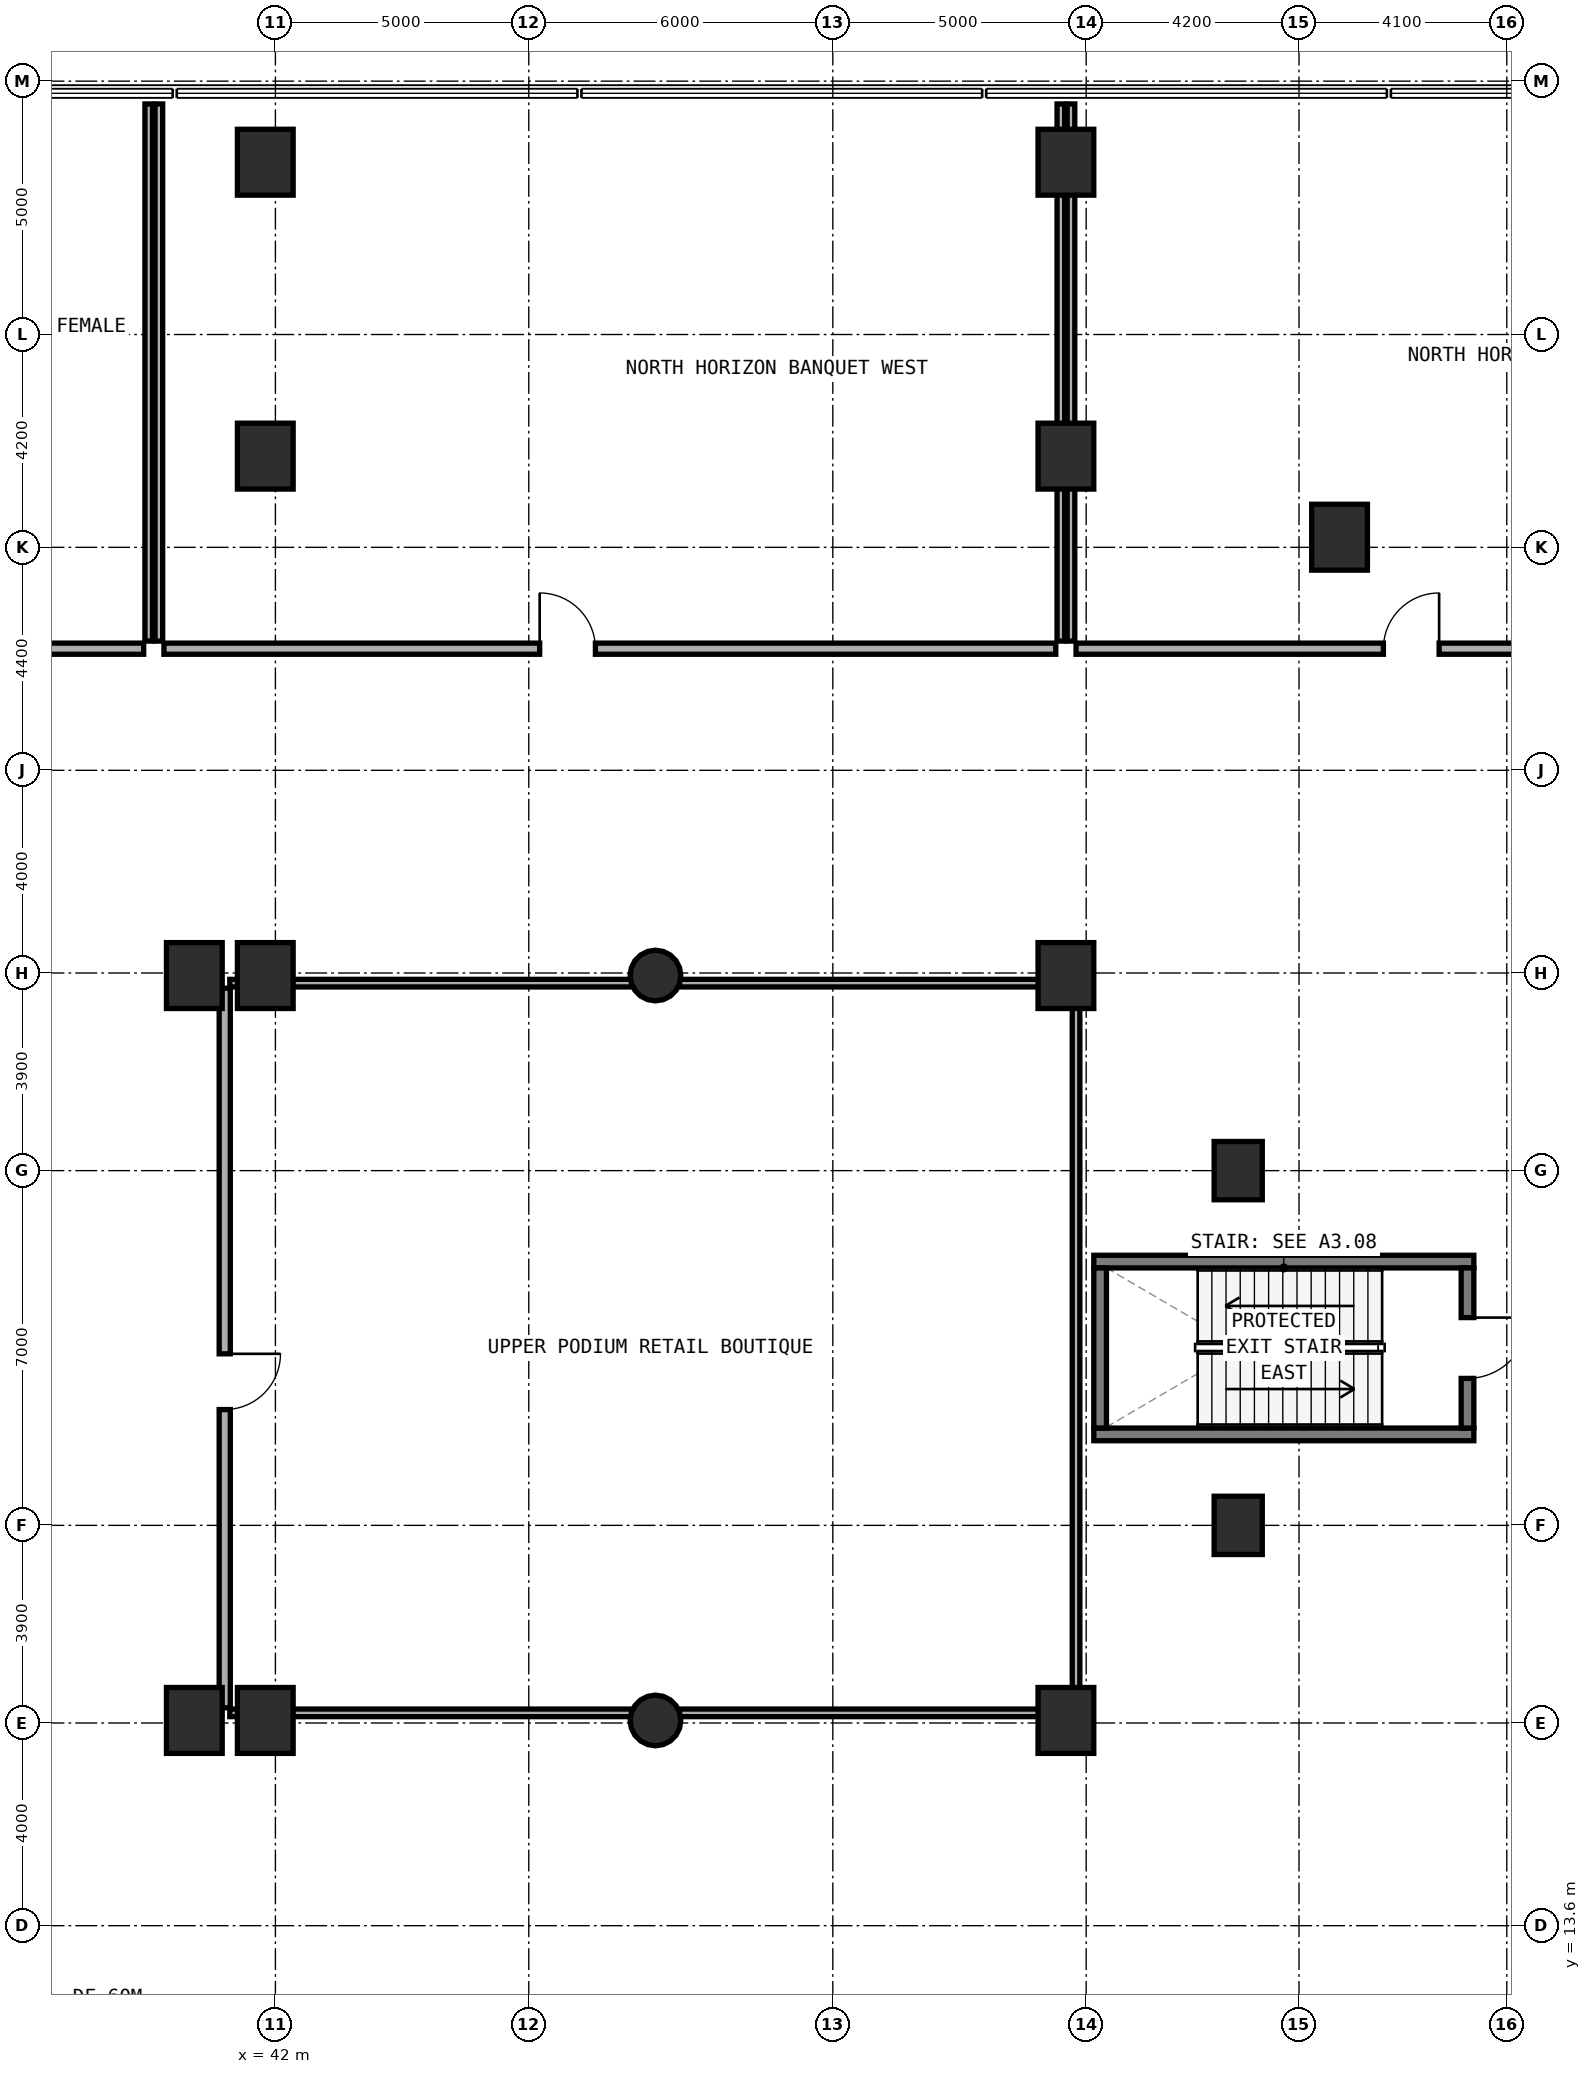
"""IFC4 building model, lengths in metres.
Left out: names, types, materials, properties, quantities, classifications, styles, units other than length and angle.
Written with IfcOpenShell. Run it as: python <this file> out.ifc"""

import sys

from ifc_helpers import new_model, si_unit, direction, frame, frame_2d, origin, origin_2d, place, context, subcontext, project, spatial, rectangle, circle, extrude, element, fill, save


model = new_model("IFC4")
c1 = context("Model", 3, precision=1e-05, world=origin(), true_north=direction((0.0, 1.0)))
c2 = subcontext(c1, "Body", "Model", "MODEL_VIEW")
j1 = project(units=[si_unit("LENGTHUNIT", "METRE"), si_unit("PLANEANGLEUNIT", "RADIAN")], contexts=[c1])
p1 = place(None, origin())
s1 = spatial("IfcSite", under=j1, at=p1, CompositionType="ELEMENT")
p2 = place(p1, origin())
s2 = spatial("IfcBuilding", under=s1, at=p2, CompositionType="ELEMENT")
p3 = place(p2, frame((0.0, 0.0, 5.4)))
s3 = spatial("IfcBuildingStorey", under=s2, at=p3, CompositionType="ELEMENT", Elevation=5.4)
for number, where, z_axis, x_axis in (
    (1, (58.15, 23.295, 0.0), (0.0, 0.0, 1.0), (1.0, 0.0, 0.0)),
    (2, (58.15, 26.705, 0.0), (0.0, 0.0, 1.0), (1.0, 0.0, 0.0)),
):
    element("IfcWall", number, at=place(p3, frame(where, z_axis=z_axis, x_axis=x_axis)), inside=s3, PredefinedType="STANDARD", context=c2, shape_type="SweptSolid", body=[
        extrude(rectangle(XDim=7.5, YDim=0.25, at=frame_2d((3.75, 0.0))), origin(), (0.0, 0.0, 1.0), 4.8),
    ])
p4 = place(p3, frame((58.275, 23.42, 0.0), z_axis=(0.0, 0.0, 1.0), x_axis=(0.0, 1.0, 0.0)))
e3 = element("IfcWall", 3, at=p4, inside=s3, PredefinedType="STANDARD", context=c2, shape_type="SweptSolid", body=[
    extrude(rectangle(XDim=3.16, YDim=0.25, at=frame_2d((1.58, 0.0))), origin(), (0.0, 0.0, 1.0), 4.8),
])
p5 = place(p3, frame((65.525, 23.42, 0.0), z_axis=(0.0, 0.0, 1.0), x_axis=(0.0, 1.0, 0.0)))
e4 = element("IfcWall", 4, at=p5, inside=s3, PredefinedType="STANDARD", context=c2, shape_type="SweptSolid", body=[
    extrude(rectangle(XDim=3.16, YDim=0.25, at=frame_2d((1.58, 0.0))), origin(), (0.0, 0.0, 1.0), 4.8),
])
p6 = place(p5, frame((0.98, 0.0, 0.0)))
e5 = element("IfcOpeningElement", 5, at=p6, cuts=e4, PredefinedType="OPENING", context=c2, shape_type="SweptSolid", body=[
    extrude(rectangle(XDim=1.2, YDim=2.15, at=frame_2d((0.6, 1.075))), frame((0.0, 0.135, 0.0), z_axis=(0.0, -1.0, 0.0), x_axis=(1.0, 0.0, 0.0)), (0.0, 0.0, 1.0), 0.27),
])
for number, where, z_axis, x_axis in (
    (6, (40.4, 17.65, 0.0), (0.0, 0.0, 1.0), (1.0, 0.0, 0.0)),
    (7, (40.4, 32.35, 0.0), (0.0, 0.0, 1.0), (1.0, 0.0, 0.0)),
):
    element("IfcColumn", number, at=place(p3, frame(where, z_axis=z_axis, x_axis=x_axis)), inside=s3, PredefinedType="COLUMN", context=c2, shape_type="SweptSolid", body=[
        extrude(rectangle(XDim=1.1, YDim=1.3, at=origin_2d()), origin(), (0.0, 0.0, 1.0), 4.8),
    ])
for number, where, z_axis, x_axis in (
    (8, (61.0, 21.5, 0.0), (0.0, 0.0, 1.0), (1.0, 0.0, 0.0)),
    (9, (61.0, 28.5, 0.0), (0.0, 0.0, 1.0), (1.0, 0.0, 0.0)),
):
    element("IfcColumn", number, at=place(p3, frame(where, z_axis=z_axis, x_axis=x_axis)), inside=s3, PredefinedType="COLUMN", context=c2, shape_type="SweptSolid", body=[
        extrude(rectangle(XDim=0.95, YDim=1.15, at=origin_2d()), origin(), (0.0, 0.0, 1.0), 4.8),
    ])
for number, where, z_axis, x_axis in (
    (10, (63.0, 41.0, 0.0), (0.0, 0.0, 1.0), (1.0, 0.0, 0.0)),
    (11, (41.8, 17.65, 0.0), (0.0, 0.0, 1.0), (1.0, 0.0, 0.0)),
    (12, (41.8, 32.35, 0.0), (0.0, 0.0, 1.0), (1.0, 0.0, 0.0)),
):
    element("IfcColumn", number, at=place(p3, frame(where, z_axis=z_axis, x_axis=x_axis)), inside=s3, PredefinedType="COLUMN", context=c2, shape_type="SweptSolid", body=[
        extrude(rectangle(XDim=1.1, YDim=1.3, at=origin_2d()), origin(), (0.0, 0.0, 1.0), 4.8),
    ])
for number, where, z_axis, x_axis in (
    (13, (49.5, 17.65, 0.0), (0.0, 0.0, 1.0), (1.0, 0.0, 0.0)),
    (14, (49.5, 32.35, 0.0), (0.0, 0.0, 1.0), (1.0, 0.0, 0.0)),
):
    element("IfcColumn", number, at=place(p3, frame(where, z_axis=z_axis, x_axis=x_axis)), inside=s3, PredefinedType="COLUMN", context=c2, shape_type="SweptSolid", body=[
        extrude(circle(Radius=0.5, at=origin_2d()), origin(), (0.0, 0.0, 1.0), 4.8),
    ])
for number, where, z_axis, x_axis in (
    (15, (57.6, 17.65, 0.0), (0.0, 0.0, 1.0), (1.0, 0.0, 0.0)),
    (16, (57.6, 32.35, 0.0), (0.0, 0.0, 1.0), (1.0, 0.0, 0.0)),
    (17, (41.8, 48.4, 0.0), (0.0, 0.0, 1.0), (1.0, 0.0, 0.0)),
    (18, (57.6, 48.4, 0.0), (0.0, 0.0, 1.0), (1.0, 0.0, 0.0)),
    (19, (41.8, 42.6, 0.0), (0.0, 0.0, 1.0), (1.0, 0.0, 0.0)),
    (20, (57.6, 42.6, 0.0), (0.0, 0.0, 1.0), (1.0, 0.0, 0.0)),
):
    element("IfcColumn", number, at=place(p3, frame(where, z_axis=z_axis, x_axis=x_axis)), inside=s3, PredefinedType="COLUMN", context=c2, shape_type="SweptSolid", body=[
        extrude(rectangle(XDim=1.1, YDim=1.3, at=origin_2d()), origin(), (0.0, 0.0, 1.0), 4.8),
    ])
p7 = place(p3, frame((57.8, 17.9, 0.0), z_axis=(0.0, 0.0, 1.0), x_axis=(0.0, 1.0, 0.0)))
e21 = element("IfcWall", 21, at=p7, inside=s3, PredefinedType="PARTITIONING", context=c2, shape_type="SweptSolid", body=[
    extrude(rectangle(XDim=14.2, YDim=0.15, at=frame_2d((7.1, 0.0))), origin(), (0.0, 0.0, 1.0), 3.725),
])
for number, where, z_axis, x_axis in (
    (22, (41.1, 17.8, 0.0), (0.0, 0.0, 1.0), (1.0, 0.0, 0.0)),
    (23, (41.1, 32.2, 0.0), (0.0, 0.0, 1.0), (1.0, 0.0, 0.0)),
):
    element("IfcWall", number, at=place(p3, frame(where, z_axis=z_axis, x_axis=x_axis)), inside=s3, PredefinedType="PARTITIONING", context=c2, shape_type="SweptSolid", body=[
        extrude(rectangle(XDim=16.6, YDim=0.15, at=frame_2d((8.3, 0.0))), origin(), (0.0, 0.0, 1.0), 3.725),
    ])
p8 = place(p3, frame((41.0, 17.9, 0.0), z_axis=(0.0, 0.0, 1.0), x_axis=(0.0, 1.0, 0.0)))
e24 = element("IfcWall", 24, at=p8, inside=s3, PredefinedType="SOLIDWALL", context=c2, shape_type="SweptSolid", body=[
    extrude(rectangle(XDim=14.2, YDim=0.22, at=frame_2d((7.1, 0.0))), origin(), (0.0, 0.0, 1.0), 4.45),
])
p9 = place(p8, frame((5.885, 0.0, 0.0)))
e25 = element("IfcOpeningElement", 25, at=p9, cuts=e24, PredefinedType="OPENING", context=c2, shape_type="SweptSolid", body=[
    extrude(rectangle(XDim=1.1, YDim=2.1, at=frame_2d((0.55, 1.05))), frame((0.0, 0.12, 0.0), z_axis=(0.0, -1.0, 0.0), x_axis=(1.0, 0.0, 0.0)), (0.0, 0.0, 1.0), 0.24),
])
p10 = place(p3, frame((39.5, 38.95, 0.0), z_axis=(0.0, 0.0, 1.0), x_axis=(0.0, 1.0, 0.0)))
e26 = element("IfcWall", 26, at=p10, inside=s3, PredefinedType="PARTITIONING", context=c2, shape_type="SweptSolid", body=[
    extrude(rectangle(XDim=10.6, YDim=0.15, at=frame_2d((5.3, 0.0))), origin(), (0.0, 0.0, 1.0), 4.45),
])
p11 = place(p3, frame((34.8, 38.8, 0.0), z_axis=(0.0, 0.0, 1.0), x_axis=(1.0, 0.0, 0.0)))
e27 = element("IfcWall", 27, at=p11, inside=s3, PredefinedType="SOLIDWALL", context=c2, shape_type="SweptSolid", body=[
    extrude(rectangle(XDim=4.6, YDim=0.22, at=frame_2d((2.3, 0.0))), origin(), (0.0, 0.0, 1.0), 4.45),
])
p12 = place(p11, frame((1.565, 0.0, 0.0)))
e28 = element("IfcOpeningElement", 28, at=p12, cuts=e27, PredefinedType="OPENING", context=c2, shape_type="SweptSolid", body=[
    extrude(rectangle(XDim=1.1, YDim=2.1, at=frame_2d((0.55, 1.05))), frame((0.0, 0.12, 0.0), z_axis=(0.0, -1.0, 0.0), x_axis=(1.0, 0.0, 0.0)), (0.0, 0.0, 1.0), 0.24),
])
p13 = place(p3, frame((39.7, 38.95, 0.0), z_axis=(0.0, 0.0, 1.0), x_axis=(0.0, 1.0, 0.0)))
e29 = element("IfcWall", 29, at=p13, inside=s3, PredefinedType="PARTITIONING", context=c2, shape_type="SweptSolid", body=[
    extrude(rectangle(XDim=10.6, YDim=0.15, at=frame_2d((5.3, 0.0))), origin(), (0.0, 0.0, 1.0), 4.45),
])
p14 = place(p3, frame((57.5, 38.95, 0.0), z_axis=(0.0, 0.0, 1.0), x_axis=(0.0, 1.0, 0.0)))
e30 = element("IfcWall", 30, at=p14, inside=s3, PredefinedType="PARTITIONING", context=c2, shape_type="SweptSolid", body=[
    extrude(rectangle(XDim=10.6, YDim=0.15, at=frame_2d((5.3, 0.0))), origin(), (0.0, 0.0, 1.0), 3.625),
])
p15 = place(p3, frame((39.8, 38.8, 0.0), z_axis=(0.0, 0.0, 1.0), x_axis=(1.0, 0.0, 0.0)))
e31 = element("IfcWall", 31, at=p15, inside=s3, PredefinedType="SOLIDWALL", context=c2, shape_type="SweptSolid", body=[
    extrude(rectangle(XDim=17.6, YDim=0.22, at=frame_2d((8.8, 0.0))), origin(), (0.0, 0.0, 1.0), 3.725),
])
p16 = place(p15, frame((7.415, 0.0, 0.0)))
e32 = element("IfcOpeningElement", 32, at=p16, cuts=e31, PredefinedType="OPENING", context=c2, shape_type="SweptSolid", body=[
    extrude(rectangle(XDim=1.1, YDim=2.1, at=frame_2d((0.55, 1.05))), frame((0.0, 0.12, 0.0), z_axis=(0.0, -1.0, 0.0), x_axis=(1.0, 0.0, 0.0)), (0.0, 0.0, 1.0), 0.24),
])
p17 = place(p3, frame((57.7, 38.95, 0.0), z_axis=(0.0, 0.0, 1.0), x_axis=(0.0, 1.0, 0.0)))
e33 = element("IfcWall", 33, at=p17, inside=s3, PredefinedType="PARTITIONING", context=c2, shape_type="SweptSolid", body=[
    extrude(rectangle(XDim=10.6, YDim=0.15, at=frame_2d((5.3, 0.0))), origin(), (0.0, 0.0, 1.0), 3.725),
])
p18 = place(p3, frame((57.8, 38.8, 0.0), z_axis=(0.0, 0.0, 1.0), x_axis=(1.0, 0.0, 0.0)))
e34 = element("IfcWall", 34, at=p18, inside=s3, PredefinedType="SOLIDWALL", context=c2, shape_type="SweptSolid", body=[
    extrude(rectangle(XDim=14.6, YDim=0.22, at=frame_2d((7.3, 0.0))), origin(), (0.0, 0.0, 1.0), 4.065),
])
p19 = place(p18, frame((6.065, 0.0, 0.0)))
e35 = element("IfcOpeningElement", 35, at=p19, cuts=e34, PredefinedType="OPENING", context=c2, shape_type="SweptSolid", body=[
    extrude(rectangle(XDim=1.1, YDim=2.1, at=frame_2d((0.55, 1.05))), frame((0.0, 0.12, 0.0), z_axis=(0.0, -1.0, 0.0), x_axis=(1.0, 0.0, 0.0)), (0.0, 0.0, 1.0), 0.24),
])
p20 = place(p6, frame((1.2, 0.0, 0.0), z_axis=(0.0, 0.0, 1.0), x_axis=(-1.0, 0.0, 0.0)))
e36 = element("IfcDoor", 36, at=p20, inside=s3, OperationType="SINGLE_SWING_LEFT", PredefinedType="DOOR", context=c2, shape_type="SweptSolid", body=[
    extrude(rectangle(XDim=1.2, YDim=2.15, at=frame_2d((0.6, 1.075))), frame((0.0, 0.025, 0.0), z_axis=(0.0, -1.0, 0.0), x_axis=(1.0, 0.0, 0.0)), (0.0, 0.0, 1.0), 0.05),
])
fill(e5, e36)
p21 = place(p9, frame((1.1, 0.0, 0.0), z_axis=(0.0, 0.0, 1.0), x_axis=(-1.0, 0.0, 0.0)))
e37 = element("IfcDoor", 37, at=p21, inside=s3, OperationType="SINGLE_SWING_LEFT", PredefinedType="DOOR", context=c2, shape_type="SweptSolid", body=[
    extrude(rectangle(XDim=1.1, YDim=2.1, at=frame_2d((0.55, 1.05))), frame((0.0, 0.025, 0.0), z_axis=(0.0, -1.0, 0.0), x_axis=(1.0, 0.0, 0.0)), (0.0, 0.0, 1.0), 0.05),
])
fill(e25, e37)
p22 = place(p16, origin())
e38 = element("IfcDoor", 38, at=p22, inside=s3, OperationType="SINGLE_SWING_LEFT", PredefinedType="DOOR", context=c2, shape_type="SweptSolid", body=[
    extrude(rectangle(XDim=1.1, YDim=2.1, at=frame_2d((0.55, 1.05))), frame((0.0, 0.025, 0.0), z_axis=(0.0, -1.0, 0.0), x_axis=(1.0, 0.0, 0.0)), (0.0, 0.0, 1.0), 0.05),
])
fill(e32, e38)
p23 = place(p19, origin())
e39 = element("IfcDoor", 39, at=p23, inside=s3, OperationType="SINGLE_SWING_RIGHT", PredefinedType="DOOR", context=c2, shape_type="SweptSolid", body=[
    extrude(rectangle(XDim=1.1, YDim=2.1, at=frame_2d((0.55, 1.05))), frame((0.0, 0.025, 0.0), z_axis=(0.0, -1.0, 0.0), x_axis=(1.0, 0.0, 0.0)), (0.0, 0.0, 1.0), 0.05),
])
fill(e35, e39)
save(model, sys.argv[1])
